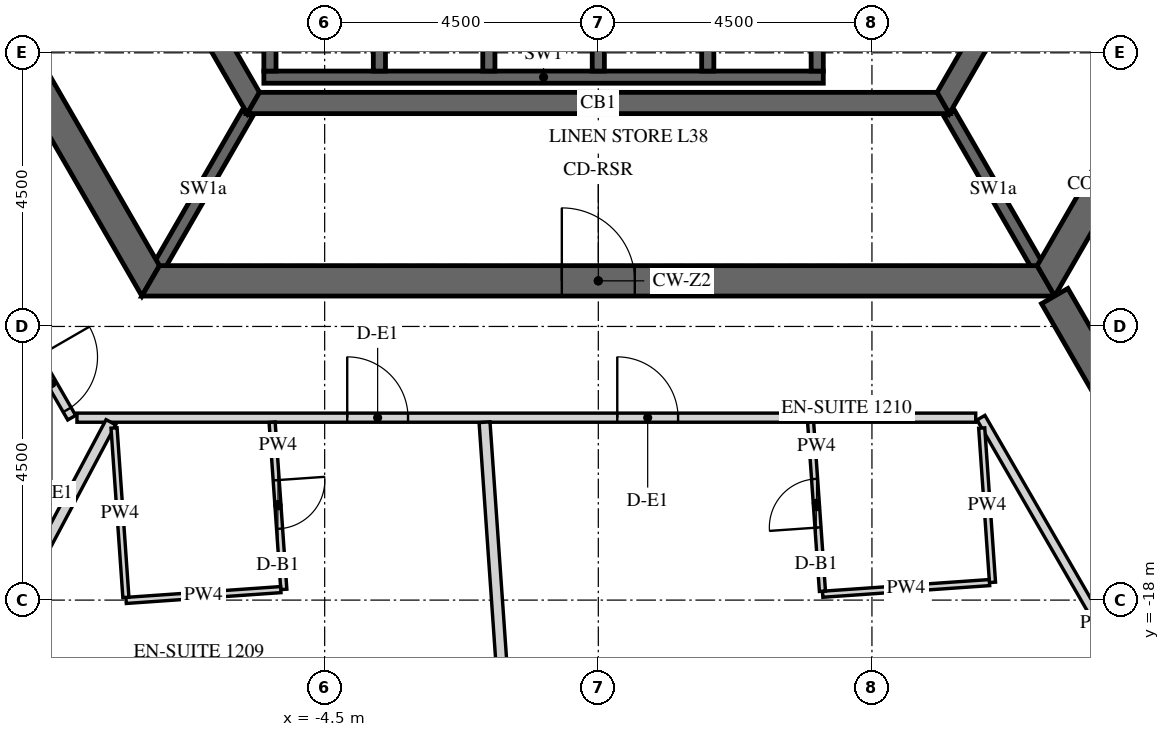
"""IFC4 building model, lengths in metres.
Left out: names, types, materials, properties, quantities, classifications, styles, units other than length and angle.
Written with IfcOpenShell. Run it as: python <this file> out.ifc"""

import sys

from ifc_helpers import new_model, si_unit, direction, frame, frame_2d, origin, place, context, subcontext, project, spatial, polyline, rectangle, outline, extrude, element, fill, save


model = new_model("IFC4")
c1 = context("Model", 3, precision=1e-05, world=origin(), true_north=direction((0.0, 1.0)))
c2 = subcontext(c1, "Body", "Model", "MODEL_VIEW")
j1 = project(units=[si_unit("LENGTHUNIT", "METRE"), si_unit("PLANEANGLEUNIT", "RADIAN")], contexts=[c1])
p1 = place(None, origin())
s1 = spatial("IfcSite", under=j1, at=p1, CompositionType="ELEMENT")
p2 = place(p1, origin())
s2 = spatial("IfcBuilding", under=s1, at=p2, CompositionType="ELEMENT")
p3 = place(p2, frame((0.0, 0.0, 164.4)))
s3 = spatial("IfcBuildingStorey", under=s2, at=p3, CompositionType="ELEMENT", Elevation=164.4)
p4 = place(p3, frame((-14.722, 0.0, -0.15), z_axis=(0.0, 0.0, 1.0), x_axis=(0.50000571537, -0.866022103989, 0.0)))
e1 = element("IfcWall", 1, at=p4, inside=s3, PredefinedType="SHEAR", context=c2, shape_type="SweptSolid", body=[
    extrude(outline(polyline([(-0.144, -0.25), (14.867, -0.25), (14.578, 0.25), (0.144, 0.25), (-0.144, -0.25)])), origin(), (0.0, 0.0, 1.0), 3.9),
])
p5 = place(p4, frame((6.432, 0.0, 0.15)))
e2 = element("IfcOpeningElement", 2, at=p5, cuts=e1, PredefinedType="OPENING", context=c2, shape_type="SweptSolid", body=[
    extrude(rectangle(XDim=1.8, YDim=2.4, at=frame_2d((0.9, 1.2))), frame((0.0, 0.26, 0.0), z_axis=(0.0, -1.0, 0.0), x_axis=(1.0, 0.0, 0.0)), (0.0, 0.0, 1.0), 0.52),
])
p6 = place(p3, frame((-7.361, -12.75, -0.15), z_axis=(0.0, 0.0, 1.0), x_axis=(1.0, 0.0, 0.0)))
e3 = element("IfcWall", 3, at=p6, inside=s3, PredefinedType="SHEAR", context=c2, shape_type="SweptSolid", body=[
    extrude(outline(polyline([(-0.144, -0.25), (14.866, -0.25), (14.578, 0.25), (0.144, 0.25), (-0.144, -0.25)])), origin(), (0.0, 0.0, 1.0), 3.9),
])
p7 = place(p6, frame((6.761, 0.0, 0.15)))
e4 = element("IfcOpeningElement", 4, at=p7, cuts=e3, PredefinedType="OPENING", context=c2, shape_type="SweptSolid", body=[
    extrude(rectangle(XDim=1.2, YDim=2.4, at=frame_2d((0.6, 1.2))), frame((0.0, 0.26, 0.0), z_axis=(0.0, -1.0, 0.0), x_axis=(1.0, 0.0, 0.0)), (0.0, 0.0, 1.0), 0.52),
])
p8 = place(p3, frame((7.361, -12.75, -0.15), z_axis=(0.0, 0.0, 1.0), x_axis=(0.50000571537, 0.866022103989, 0.0)))
e5 = element("IfcWall", 5, at=p8, inside=s3, PredefinedType="SHEAR", context=c2, shape_type="SweptSolid", body=[
    extrude(outline(polyline([(-0.144, -0.25), (14.867, -0.25), (14.578, 0.25), (0.144, 0.25), (-0.144, -0.25)])), origin(), (0.0, 0.0, 1.0), 3.9),
])
p9 = place(p8, frame((6.49, 0.0, 0.15)))
e6 = element("IfcOpeningElement", 6, at=p9, cuts=e5, PredefinedType="OPENING", context=c2, shape_type="SweptSolid", body=[
    extrude(rectangle(XDim=1.8, YDim=2.4, at=frame_2d((0.9, 1.2))), frame((0.0, 0.26, 0.0), z_axis=(0.0, -1.0, 0.0), x_axis=(1.0, 0.0, 0.0)), (0.0, 0.0, 1.0), 0.52),
])
p10 = place(p3, frame((7.506, -13.0, -0.15), z_axis=(0.0, 0.0, 1.0), x_axis=(0.499988271576, -0.866032175087, 0.0)))
e7 = element("IfcWall", 7, at=p10, inside=s3, PredefinedType="SHEAR", context=c2, shape_type="SweptSolid", body=[
    extrude(rectangle(XDim=15.424, YDim=0.5, at=frame_2d((7.712, 0.0))), origin(), (0.0, 0.0, 1.0), 3.9),
])
p11 = place(p10, frame((6.812, 0.0, 0.15)))
e8 = element("IfcOpeningElement", 8, at=p11, cuts=e7, PredefinedType="OPENING", context=c2, shape_type="SweptSolid", body=[
    extrude(rectangle(XDim=1.8, YDim=2.4, at=frame_2d((0.9, 1.2))), frame((0.0, 0.26, 0.0), z_axis=(0.0, -1.0, 0.0), x_axis=(1.0, 0.0, 0.0)), (0.0, 0.0, 1.0), 0.52),
])
p12 = place(p3, frame((-11.345, 0.0, -0.15), z_axis=(0.0, 0.0, 1.0), x_axis=(0.499995046907, -0.866028263435, 0.0)))
e9 = element("IfcWall", 9, at=p12, inside=s3, PredefinedType="SHEAR", context=c2, shape_type="SweptSolid", body=[
    extrude(outline(polyline([(-0.101, -0.175), (11.446, -0.175), (11.244, 0.175), (0.101, 0.175), (-0.101, -0.175)])), origin(), (0.0, 0.0, 1.0), 3.9),
])
p13 = place(p12, frame((4.744, 0.0, 0.15)))
e10 = element("IfcOpeningElement", 10, at=p13, cuts=e9, PredefinedType="OPENING", context=c2, shape_type="SweptSolid", body=[
    extrude(rectangle(XDim=1.8, YDim=2.4, at=frame_2d((0.9, 1.2))), frame((0.0, 0.185, 0.0), z_axis=(0.0, -1.0, 0.0), x_axis=(1.0, 0.0, 0.0)), (0.0, 0.0, 1.0), 0.37),
])
p14 = place(p3, frame((-5.673, -9.825, -0.15), z_axis=(0.0, 0.0, 1.0), x_axis=(1.0, 0.0, 0.0)))
e11 = element("IfcWall", 11, at=p14, inside=s3, PredefinedType="SHEAR", context=c2, shape_type="SweptSolid", body=[
    extrude(outline(polyline([(-0.101, -0.175), (11.446, -0.175), (11.244, 0.175), (0.101, 0.175), (-0.101, -0.175)])), origin(), (0.0, 0.0, 1.0), 3.9),
])
p15 = place(p3, frame((5.673, -9.825, -0.15), z_axis=(0.0, 0.0, 1.0), x_axis=(0.499995046907, 0.866028263435, 0.0)))
e12 = element("IfcWall", 12, at=p15, inside=s3, PredefinedType="SHEAR", context=c2, shape_type="SweptSolid", body=[
    extrude(outline(polyline([(-0.101, -0.175), (11.446, -0.175), (11.244, 0.175), (0.101, 0.175), (-0.101, -0.175)])), origin(), (0.0, 0.0, 1.0), 3.9),
])
p16 = place(p15, frame((4.801, 0.0, 0.15)))
e13 = element("IfcOpeningElement", 13, at=p16, cuts=e12, PredefinedType="OPENING", context=c2, shape_type="SweptSolid", body=[
    extrude(rectangle(XDim=1.8, YDim=2.4, at=frame_2d((0.9, 1.2))), frame((0.0, 0.185, 0.0), z_axis=(0.0, -1.0, 0.0), x_axis=(1.0, 0.0, 0.0)), (0.0, 0.0, 1.0), 0.37),
])
p17 = place(p3, frame((-5.5, -9.4, -0.25), z_axis=(0.0, 0.0, 1.0), x_axis=(1.0, 0.0, 0.0)))
e14 = element("IfcWall", 14, at=p17, inside=s3, PredefinedType="SHEAR", context=c2, shape_type="SweptSolid", body=[
    extrude(rectangle(XDim=9.2, YDim=0.2, at=frame_2d((4.6, 0.0))), origin(), (0.0, 0.0, 1.0), 3.9),
])
for number, where, z_axis, x_axis in (
    (15, (-5.4, -9.3, -0.25), (0.0, 0.0, 1.0), (0.0, 1.0, 0.0)),
    (16, (-3.6, -9.3, -0.25), (0.0, 0.0, 1.0), (0.0, 1.0, 0.0)),
    (17, (-1.8, -9.3, -0.25), (0.0, 0.0, 1.0), (0.0, 1.0, 0.0)),
    (18, (0.0, -9.3, -0.25), (0.0, 0.0, 1.0), (0.0, 1.0, 0.0)),
    (19, (1.8, -9.3, -0.25), (0.0, 0.0, 1.0), (0.0, 1.0, 0.0)),
    (20, (3.6, -9.3, -0.25), (0.0, 0.0, 1.0), (0.0, 1.0, 0.0)),
):
    element("IfcWall", number, at=place(p3, frame(where, z_axis=z_axis, x_axis=x_axis)), inside=s3, PredefinedType="SHEAR", context=c2, shape_type="SweptSolid", body=[
        extrude(rectangle(XDim=2.9, YDim=0.2, at=frame_2d((1.45, 0.0))), origin(), (0.0, 0.0, 1.0), 3.9),
    ])
for number, where, z_axis, x_axis in (
    (21, (-5.773, -10.0, -0.15), (0.0, 0.0, 1.0), (-0.5, -0.866, 0.0)),
    (22, (5.773, -10.0, -0.15), (0.0, 0.0, 1.0), (0.5, -0.866, 0.0)),
):
    element("IfcWall", number, at=place(p3, frame(where, z_axis=z_axis, x_axis=x_axis)), inside=s3, PredefinedType="SHEAR", context=c2, shape_type="SweptSolid", body=[
        extrude(rectangle(XDim=2.887, YDim=0.2, at=frame_2d((1.443, 0.0))), origin(), (0.0, 0.0, 1.0), 3.9),
    ])
p18 = place(p3, frame((-16.094, -2.125, 0.0), z_axis=(0.0, 0.0, 1.0), x_axis=(0.500010545262, -0.866019315389, 0.0)))
e23 = element("IfcWall", 23, at=p18, inside=s3, PredefinedType="PARTITIONING", context=c2, shape_type="SweptSolid", body=[
    extrude(rectangle(XDim=14.867, YDim=0.15, at=frame_2d((7.434, 0.0))), origin(), (0.0, 0.0, 1.0), 2.988),
])
p19 = place(p18, frame((3.619, 0.0, 0.0)))
e24 = element("IfcOpeningElement", 24, at=p19, cuts=e23, PredefinedType="OPENING", context=c2, shape_type="SweptSolid", body=[
    extrude(rectangle(XDim=1.0, YDim=2.1, at=frame_2d((0.5, 1.05))), frame((0.0, 0.085, 0.0), z_axis=(0.0, -1.0, 0.0), x_axis=(1.0, 0.0, 0.0)), (0.0, 0.0, 1.0), 0.17),
])
p20 = place(p18, frame((9.924, 0.0, 0.0)))
e25 = element("IfcOpeningElement", 25, at=p20, cuts=e23, PredefinedType="OPENING", context=c2, shape_type="SweptSolid", body=[
    extrude(rectangle(XDim=1.0, YDim=2.1, at=frame_2d((0.5, 1.05))), frame((0.0, 0.085, 0.0), z_axis=(0.0, -1.0, 0.0), x_axis=(1.0, 0.0, 0.0)), (0.0, 0.0, 1.0), 0.17),
])
p21 = place(p18, frame((13.717, 0.0, 0.0)))
e26 = element("IfcOpeningElement", 26, at=p21, cuts=e23, PredefinedType="OPENING", context=c2, shape_type="SweptSolid", body=[
    extrude(rectangle(XDim=1.0, YDim=2.1, at=frame_2d((0.5, 1.05))), frame((0.0, 0.085, 0.0), z_axis=(0.0, -1.0, 0.0), x_axis=(1.0, 0.0, 0.0)), (0.0, 0.0, 1.0), 0.17),
])
p22 = place(p3, frame((-8.574, -15.0, 0.0), z_axis=(0.0, 0.0, 1.0), x_axis=(1.0, 0.0, 0.0)))
e27 = element("IfcWall", 27, at=p22, inside=s3, PredefinedType="PARTITIONING", context=c2, shape_type="SweptSolid", body=[
    extrude(rectangle(XDim=14.78, YDim=0.15, at=frame_2d((7.39, 0.0))), origin(), (0.0, 0.0, 1.0), 2.988),
])
p23 = place(p22, frame((4.445, 0.0, 0.0)))
e28 = element("IfcOpeningElement", 28, at=p23, cuts=e27, PredefinedType="OPENING", context=c2, shape_type="SweptSolid", body=[
    extrude(rectangle(XDim=1.0, YDim=2.1, at=frame_2d((0.5, 1.05))), frame((0.0, 0.085, 0.0), z_axis=(0.0, -1.0, 0.0), x_axis=(1.0, 0.0, 0.0)), (0.0, 0.0, 1.0), 0.17),
])
p24 = place(p22, frame((8.885, 0.0, 0.0)))
e29 = element("IfcOpeningElement", 29, at=p24, cuts=e27, PredefinedType="OPENING", context=c2, shape_type="SweptSolid", body=[
    extrude(rectangle(XDim=1.0, YDim=2.1, at=frame_2d((0.5, 1.05))), frame((0.0, 0.085, 0.0), z_axis=(0.0, -1.0, 0.0), x_axis=(1.0, 0.0, 0.0)), (0.0, 0.0, 1.0), 0.17),
])
p25 = place(p3, frame((6.293, -15.0, 0.0), z_axis=(0.0, 0.0, 1.0), x_axis=(0.499980313799, -0.86603676932, 0.0)))
e30 = element("IfcWall", 30, at=p25, inside=s3, PredefinedType="PARTITIONING", context=c2, shape_type="SweptSolid", body=[
    extrude(rectangle(XDim=7.786, YDim=0.15, at=frame_2d((3.893, 0.0))), origin(), (0.0, 0.0, 1.0), 2.988),
])
p26 = place(p3, frame((-14.876, -27.977, 0.0), z_axis=(0.0, 0.0, 1.0), x_axis=(0.469468328163, 0.882949312731, 0.0)))
e31 = element("IfcWall", 31, at=p26, inside=s3, PredefinedType="PARTITIONING", context=c2, shape_type="SweptSolid", body=[
    extrude(rectangle(XDim=14.613, YDim=0.18, at=frame_2d((7.306, 0.0))), origin(), (0.0, 0.0, 1.0), 2.988),
])
p27 = place(p3, frame((-5.364, -15.075, 0.0), z_axis=(0.0, 0.0, 1.0), x_axis=(0.06972333312, -0.997566367125, 0.0)))
e32 = element("IfcWall", 32, at=p27, inside=s3, PredefinedType="PARTITIONING", context=c2, shape_type="SweptSolid", body=[
    extrude(rectangle(XDim=2.756, YDim=0.1, at=frame_2d((1.378, 0.0))), origin(), (0.0, 0.0, 1.0), 2.988),
])
p28 = place(p27, frame((0.956, 0.0, 0.0)))
e33 = element("IfcOpeningElement", 33, at=p28, cuts=e32, PredefinedType="OPENING", context=c2, shape_type="SweptSolid", body=[
    extrude(rectangle(XDim=0.8, YDim=2.1, at=frame_2d((0.4, 1.05))), frame((0.0, 0.06, 0.0), z_axis=(0.0, -1.0, 0.0), x_axis=(1.0, 0.0, 0.0)), (0.0, 0.0, 1.0), 0.12),
])
p29 = place(p3, frame((-5.222, -17.828, 0.0), z_axis=(0.0, 0.0, 1.0), x_axis=(-0.997567829494, -0.069702407128, 0.0)))
e34 = element("IfcWall", 34, at=p29, inside=s3, PredefinedType="PARTITIONING", context=c2, shape_type="SweptSolid", body=[
    extrude(rectangle(XDim=2.55, YDim=0.1, at=frame_2d((1.275, 0.0))), origin(), (0.0, 0.0, 1.0), 2.988),
])
p30 = place(p3, frame((-7.769, -17.956, 0.0), z_axis=(0.0, 0.0, 1.0), x_axis=(-0.069756058123, 0.997564079323, 0.0)))
e35 = element("IfcWall", 35, at=p30, inside=s3, PredefinedType="PARTITIONING", context=c2, shape_type="SweptSolid", body=[
    extrude(rectangle(XDim=2.793, YDim=0.1, at=frame_2d((1.396, 0.0))), origin(), (0.0, 0.0, 1.0), 2.988),
])
p31 = place(p3, frame((-0.996, -27.587, 0.0), z_axis=(0.0, 0.0, 1.0), x_axis=(-0.069744671963, 0.997564875451, 0.0)))
e36 = element("IfcWall", 36, at=p31, inside=s3, PredefinedType="PARTITIONING", context=c2, shape_type="SweptSolid", body=[
    extrude(rectangle(XDim=12.542, YDim=0.18, at=frame_2d((6.271, 0.0))), origin(), (0.0, 0.0, 1.0), 2.988),
])
p32 = place(p3, frame((6.305, -15.171, 0.0), z_axis=(0.0, 0.0, 1.0), x_axis=(0.069671554491, -0.99756998476, 0.0)))
e37 = element("IfcWall", 37, at=p32, inside=s3, PredefinedType="PARTITIONING", context=c2, shape_type="SweptSolid", body=[
    extrude(rectangle(XDim=2.544, YDim=0.1, at=frame_2d((1.272, 0.0))), origin(), (0.0, 0.0, 1.0), 2.988),
])
p33 = place(p3, frame((6.433, -17.712, 0.0), z_axis=(0.0, 0.0, 1.0), x_axis=(-0.997562614302, -0.069777005859, 0.0)))
e38 = element("IfcWall", 38, at=p33, inside=s3, PredefinedType="PARTITIONING", context=c2, shape_type="SweptSolid", body=[
    extrude(rectangle(XDim=2.75, YDim=0.1, at=frame_2d((1.375, 0.0))), origin(), (0.0, 0.0, 1.0), 2.988),
])
p34 = place(p3, frame((3.686, -17.854, 0.0), z_axis=(0.0, 0.0, 1.0), x_axis=(-0.069758488261, 0.997563909389, 0.0)))
e39 = element("IfcWall", 39, at=p34, inside=s3, PredefinedType="PARTITIONING", context=c2, shape_type="SweptSolid", body=[
    extrude(rectangle(XDim=2.786, YDim=0.1, at=frame_2d((1.393, 0.0))), origin(), (0.0, 0.0, 1.0), 2.988),
])
p35 = place(p34, frame((1.05, 0.0, 0.0)))
e40 = element("IfcOpeningElement", 40, at=p35, cuts=e39, PredefinedType="OPENING", context=c2, shape_type="SweptSolid", body=[
    extrude(rectangle(XDim=0.8, YDim=2.1, at=frame_2d((0.4, 1.05))), frame((0.0, 0.06, 0.0), z_axis=(0.0, -1.0, 0.0), x_axis=(1.0, 0.0, 0.0)), (0.0, 0.0, 1.0), 0.12),
])
p36 = place(p7, origin())
e41 = element("IfcDoor", 41, at=p36, inside=s3, OperationType="SINGLE_SWING_LEFT", PredefinedType="DOOR", context=c2, shape_type="SweptSolid", body=[
    extrude(rectangle(XDim=1.2, YDim=2.4, at=frame_2d((0.6, 1.2))), frame((0.0, 0.025, 0.0), z_axis=(0.0, -1.0, 0.0), x_axis=(1.0, 0.0, 0.0)), (0.0, 0.0, 1.0), 0.05),
])
fill(e4, e41)
p37 = place(p21, origin())
e42 = element("IfcDoor", 42, at=p37, inside=s3, OperationType="SINGLE_SWING_LEFT", PredefinedType="DOOR", context=c2, shape_type="SweptSolid", body=[
    extrude(rectangle(XDim=1.0, YDim=2.1, at=frame_2d((0.5, 1.05))), frame((0.0, 0.025, 0.0), z_axis=(0.0, -1.0, 0.0), x_axis=(1.0, 0.0, 0.0)), (0.0, 0.0, 1.0), 0.05),
])
fill(e26, e42)
p38 = place(p23, origin())
e43 = element("IfcDoor", 43, at=p38, inside=s3, OperationType="SINGLE_SWING_LEFT", PredefinedType="DOOR", context=c2, shape_type="SweptSolid", body=[
    extrude(rectangle(XDim=1.0, YDim=2.1, at=frame_2d((0.5, 1.05))), frame((0.0, 0.025, 0.0), z_axis=(0.0, -1.0, 0.0), x_axis=(1.0, 0.0, 0.0)), (0.0, 0.0, 1.0), 0.05),
])
fill(e28, e43)
p39 = place(p28, origin())
e44 = element("IfcDoor", 44, at=p39, inside=s3, OperationType="SINGLE_SWING_LEFT", PredefinedType="DOOR", context=c2, shape_type="SweptSolid", body=[
    extrude(rectangle(XDim=0.8, YDim=2.1, at=frame_2d((0.4, 1.05))), frame((0.0, 0.025, 0.0), z_axis=(0.0, -1.0, 0.0), x_axis=(1.0, 0.0, 0.0)), (0.0, 0.0, 1.0), 0.05),
])
fill(e33, e44)
p40 = place(p24, origin())
e45 = element("IfcDoor", 45, at=p40, inside=s3, OperationType="SINGLE_SWING_RIGHT", PredefinedType="DOOR", context=c2, shape_type="SweptSolid", body=[
    extrude(rectangle(XDim=1.0, YDim=2.1, at=frame_2d((0.5, 1.05))), frame((0.0, 0.025, 0.0), z_axis=(0.0, -1.0, 0.0), x_axis=(1.0, 0.0, 0.0)), (0.0, 0.0, 1.0), 0.05),
])
fill(e29, e45)
p41 = place(p35, origin())
e46 = element("IfcDoor", 46, at=p41, inside=s3, OperationType="SINGLE_SWING_LEFT", PredefinedType="DOOR", context=c2, shape_type="SweptSolid", body=[
    extrude(rectangle(XDim=0.8, YDim=2.1, at=frame_2d((0.4, 1.05))), frame((0.0, 0.025, 0.0), z_axis=(0.0, -1.0, 0.0), x_axis=(1.0, 0.0, 0.0)), (0.0, 0.0, 1.0), 0.05),
])
fill(e40, e46)
save(model, sys.argv[1])
